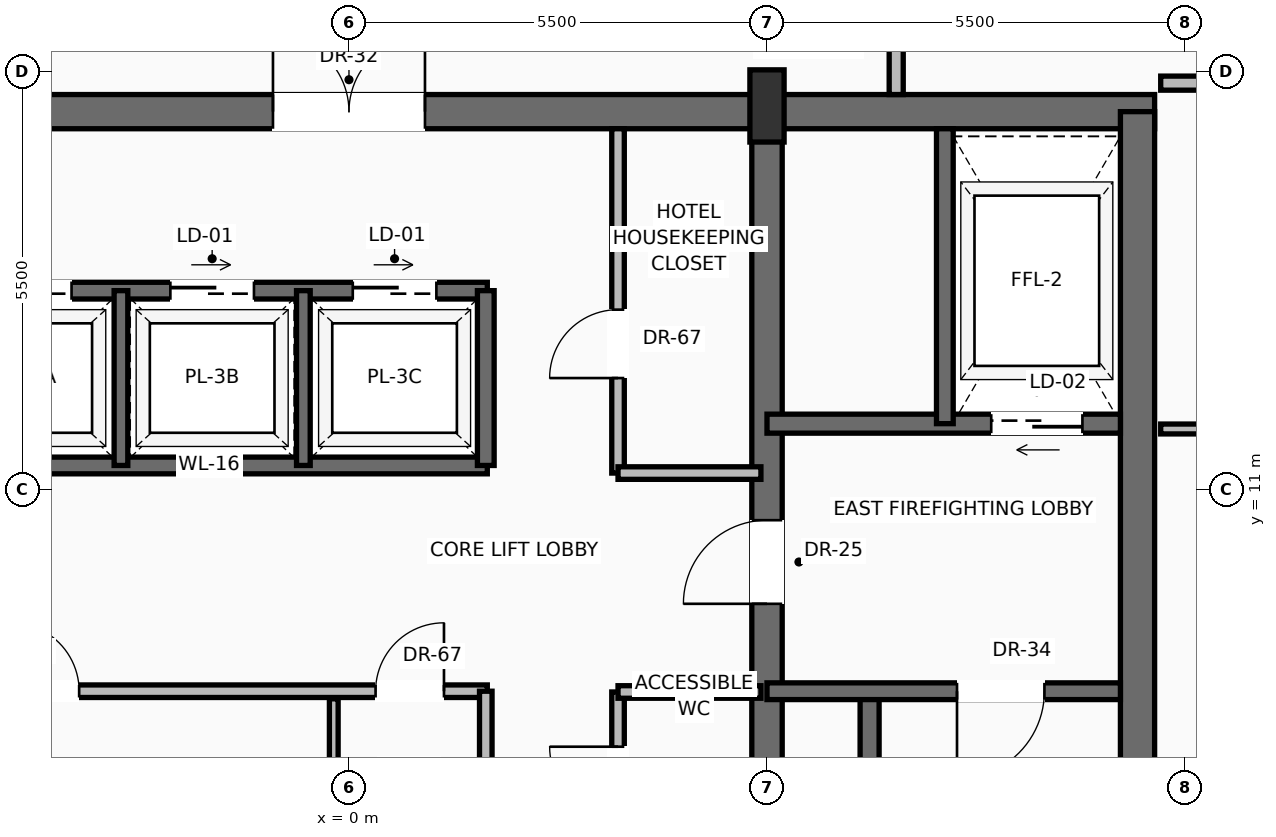
"""IFC4 building model, lengths in metres.
Left out: names, types, materials, properties, quantities, classifications, styles, units other than length and angle.
Written with IfcOpenShell. Run it as: python <this file> out.ifc"""

import sys

from ifc_helpers import new_model, si_unit, direction, frame, frame_2d, origin, origin_2d, place, context, subcontext, project, spatial, rectangle, extrude, source, transform, mapped, element, fill, save


model = new_model("IFC4")
c1 = context("Model", 3, precision=1e-05, world=origin(), true_north=direction((0.0, 1.0)))
c2 = subcontext(c1, "Body", "Model", "MODEL_VIEW")
j1 = project(units=[si_unit("LENGTHUNIT", "METRE"), si_unit("PLANEANGLEUNIT", "RADIAN")], contexts=[c1])
p1 = place(None, origin())
s1 = spatial("IfcSite", under=j1, at=p1, CompositionType="ELEMENT")
p2 = place(p1, origin())
s2 = spatial("IfcBuilding", under=s1, at=p2, CompositionType="ELEMENT")
p3 = place(p2, frame((0.0, 0.0, 293.7)))
s3 = spatial("IfcBuildingStorey", under=s2, at=p3, CompositionType="ELEMENT", Elevation=293.7)
p4 = place(p3, frame((-10.6, 15.975, 0.0), z_axis=(0.0, 0.0, 1.0), x_axis=(1.0, 0.0, 0.0)))
e1 = element("IfcWall", 1, at=p4, inside=s3, PredefinedType="SHEAR", context=c2, shape_type="SweptSolid", body=[
    extrude(rectangle(XDim=21.2, YDim=0.45, at=frame_2d((10.6, 0.0))), origin(), (0.0, 0.0, 1.0), 3.24),
])
p5 = place(p4, frame((3.17, 0.0, 0.0)))
e2 = element("IfcOpeningElement", 2, at=p5, cuts=e1, PredefinedType="OPENING", context=c2, shape_type="SweptSolid", body=[
    extrude(rectangle(XDim=1.3, YDim=2.3, at=frame_2d((0.65, 1.15))), frame((0.0, 0.235, 0.0), z_axis=(0.0, -1.0, 0.0), x_axis=(1.0, 0.0, 0.0)), (0.0, 0.0, 1.0), 0.47),
])
p6 = place(p4, frame((9.6, 0.0, 0.0)))
e3 = element("IfcOpeningElement", 3, at=p6, cuts=e1, PredefinedType="OPENING", context=c2, shape_type="SweptSolid", body=[
    extrude(rectangle(XDim=2.0, YDim=2.4, at=frame_2d((1.0, 1.2))), frame((0.0, 0.235, 0.0), z_axis=(0.0, -1.0, 0.0), x_axis=(1.0, 0.0, 0.0)), (0.0, 0.0, 1.0), 0.47),
])
p7 = place(p3, frame((10.375, 0.625, 0.0), z_axis=(0.0, 0.0, 1.0), x_axis=(0.0, 1.0, 0.0)))
e4 = element("IfcWall", 4, at=p7, inside=s3, PredefinedType="SHEAR", context=c2, shape_type="SweptSolid", body=[
    extrude(rectangle(XDim=15.35, YDim=0.45, at=frame_2d((7.675, 0.0))), origin(), (0.0, 0.0, 1.0), 3.24),
])
p8 = place(p3, frame((5.5, 0.625, 0.0), z_axis=(0.0, 0.0, 1.0), x_axis=(0.0, 1.0, 0.0)))
e5 = element("IfcWall", 5, at=p8, inside=s3, PredefinedType="SHEAR", context=c2, shape_type="SweptSolid", body=[
    extrude(rectangle(XDim=15.35, YDim=0.4, at=frame_2d((7.675, 0.0))), origin(), (0.0, 0.0, 1.0), 3.24),
])
p9 = place(p8, frame((8.875, 0.0, 0.0)))
e6 = element("IfcOpeningElement", 6, at=p9, cuts=e5, PredefinedType="OPENING", context=c2, shape_type="SweptSolid", body=[
    extrude(rectangle(XDim=1.1, YDim=2.2, at=frame_2d((0.55, 1.1))), frame((0.0, 0.21, 0.0), z_axis=(0.0, -1.0, 0.0), x_axis=(1.0, 0.0, 0.0)), (0.0, 0.0, 1.0), 0.42),
])
m1 = source(origin(), c2, "Body", "SweptSolid", [
    extrude(rectangle(XDim=0.45, YDim=0.95, at=origin_2d()), origin(), (0.0, 0.0, 1.0), 3.45),
])
p10 = place(p3, frame((5.5, 16.05, 0.0), z_axis=(0.0, 0.0, 1.0), x_axis=(1.0, 0.0, 0.0)))
e7 = element("IfcColumn", 7, at=p10, inside=s3, PredefinedType="PILASTER", context=c2, shape_type="MappedRepresentation", body=[
    mapped(m1, transform((0.0, 0.0, 0.0), scale=1.0)),
])
p11 = place(p3, frame((7.626, 31.593, 0.0), z_axis=(0.0, 0.0, 1.0), x_axis=(0.500533605719, -0.865717107112, 0.0)))
e8 = element("IfcWall", 8, at=p11, inside=s3, PredefinedType="SOLIDWALL", context=c2, shape_type="SweptSolid", body=[
    extrude(rectangle(XDim=20.145, YDim=0.28, at=frame_2d((10.072, 0.0))), origin(), (0.0, 0.0, 1.0), 2.82),
])
p12 = place(p11, frame((4.835, 0.0, 0.0)))
e9 = element("IfcOpeningElement", 9, at=p12, cuts=e8, PredefinedType="OPENING", context=c2, shape_type="SweptSolid", body=[
    extrude(rectangle(XDim=1.6, YDim=2.35, at=frame_2d((0.8, 1.175))), frame((0.0, 0.15, 0.0), z_axis=(0.0, -1.0, 0.0), x_axis=(1.0, 0.0, 0.0)), (0.0, 0.0, 1.0), 0.3),
])
p13 = place(p11, frame((13.698, 0.0, 0.9)))
e10 = element("IfcOpeningElement", 10, at=p13, cuts=e8, PredefinedType="OPENING", context=c2, shape_type="SweptSolid", body=[
    extrude(rectangle(XDim=1.55, YDim=1.75, at=frame_2d((0.775, 0.875))), frame((0.0, 0.15, 0.0), z_axis=(0.0, -1.0, 0.0), x_axis=(1.0, 0.0, 0.0)), (0.0, 0.0, 1.0), 0.3),
])
p14 = place(p3, frame((6.85, 0.85, 0.0), z_axis=(0.0, 0.0, 1.0), x_axis=(0.0, 1.0, 0.0)))
e11 = element("IfcWall", 11, at=p14, inside=s3, PredefinedType="SOLIDWALL", context=c2, shape_type="SweptSolid", body=[
    extrude(rectangle(XDim=7.5, YDim=0.25, at=frame_2d((3.75, 0.0))), origin(), (0.0, 0.0, 1.0), 3.24),
])
p15 = place(p3, frame((10.15, 8.35, 0.0), z_axis=(0.0, 0.0, 1.0), x_axis=(-1.0, 0.0, 0.0)))
e12 = element("IfcWall", 12, at=p15, inside=s3, PredefinedType="SOLIDWALL", context=c2, shape_type="SweptSolid", body=[
    extrude(rectangle(XDim=4.65, YDim=0.22, at=frame_2d((2.325, 0.0))), origin(), (0.0, 0.0, 1.0), 3.24),
])
p16 = place(p15, frame((1.0, 0.0, 0.0)))
e13 = element("IfcOpeningElement", 13, at=p16, cuts=e12, PredefinedType="OPENING", context=c2, shape_type="SweptSolid", body=[
    extrude(rectangle(XDim=1.15, YDim=2.2, at=frame_2d((0.575, 1.1))), frame((0.0, 0.12, 0.0), z_axis=(0.0, -1.0, 0.0), x_axis=(1.0, 0.0, 0.0)), (0.0, 0.0, 1.0), 0.24),
])
p17 = place(p3, frame((10.15, 11.87, 0.0), z_axis=(0.0, 0.0, 1.0), x_axis=(-1.0, 0.0, 0.0)))
e14 = element("IfcWall", 14, at=p17, inside=s3, PredefinedType="SOLIDWALL", context=c2, shape_type="SweptSolid", body=[
    extrude(rectangle(XDim=4.65, YDim=0.25, at=frame_2d((2.325, 0.0))), origin(), (0.0, 0.0, 1.0), 3.24),
])
p18 = place(p17, frame((0.5, 0.0, 0.0)))
e15 = element("IfcOpeningElement", 15, at=p18, cuts=e14, PredefinedType="OPENING", context=c2, shape_type="SweptSolid", body=[
    extrude(rectangle(XDim=1.2, YDim=2.25, at=frame_2d((0.6, 1.125))), frame((0.0, 0.135, 0.0), z_axis=(0.0, -1.0, 0.0), x_axis=(1.0, 0.0, 0.0)), (0.0, 0.0, 1.0), 0.27),
])
p19 = place(p3, frame((7.84, 11.87, 0.0), z_axis=(0.0, 0.0, 1.0), x_axis=(0.0, 1.0, 0.0)))
e16 = element("IfcWall", 16, at=p19, inside=s3, PredefinedType="SOLIDWALL", context=c2, shape_type="SweptSolid", body=[
    extrude(rectangle(XDim=3.88, YDim=0.22, at=frame_2d((1.94, 0.0))), origin(), (0.0, 0.0, 1.0), 3.24),
])
p20 = place(p3, frame((3.54, 6.0, 0.0), z_axis=(0.0, 0.0, 1.0), x_axis=(0.0, 1.0, 0.0)))
e17 = element("IfcWall", 17, at=p20, inside=s3, PredefinedType="PARTITIONING", context=c2, shape_type="SweptSolid", body=[
    extrude(rectangle(XDim=2.34, YDim=0.165, at=frame_2d((1.17, 0.0))), origin(), (0.0, 0.0, 1.0), 3.232),
])
p21 = place(p20, frame((0.72, 0.0, 0.0)))
e18 = element("IfcOpeningElement", 18, at=p21, cuts=e17, PredefinedType="OPENING", context=c2, shape_type="SweptSolid", body=[
    extrude(rectangle(XDim=0.9, YDim=2.1, at=frame_2d((0.45, 1.05))), frame((0.0, 0.093, 0.0), z_axis=(0.0, -1.0, 0.0), x_axis=(1.0, 0.0, 0.0)), (0.0, 0.0, 1.0), 0.185),
])
p22 = place(p3, frame((3.54, 8.34, 0.0), z_axis=(0.0, 0.0, 1.0), x_axis=(1.0, 0.0, 0.0)))
e19 = element("IfcWall", 19, at=p22, inside=s3, PredefinedType="PARTITIONING", context=c2, shape_type="SweptSolid", body=[
    extrude(rectangle(XDim=1.88, YDim=0.165, at=frame_2d((0.94, 0.0))), origin(), (0.0, 0.0, 1.0), 3.232),
])
p23 = place(p3, frame((-5.3, 8.35, 0.0), z_axis=(0.0, 0.0, 1.0), x_axis=(1.0, 0.0, 0.0)))
e20 = element("IfcWall", 20, at=p23, inside=s3, PredefinedType="PARTITIONING", context=c2, shape_type="SweptSolid", body=[
    extrude(rectangle(XDim=7.12, YDim=0.165, at=frame_2d((3.56, 0.0))), origin(), (0.0, 0.0, 1.0), 3.232),
])
p24 = place(p23, frame((0.85, 0.0, 0.0)))
e21 = element("IfcOpeningElement", 21, at=p24, cuts=e20, PredefinedType="OPENING", context=c2, shape_type="SweptSolid", body=[
    extrude(rectangle(XDim=0.9, YDim=2.1, at=frame_2d((0.45, 1.05))), frame((0.0, 0.093, 0.0), z_axis=(0.0, -1.0, 0.0), x_axis=(1.0, 0.0, 0.0)), (0.0, 0.0, 1.0), 0.185),
])
p25 = place(p23, frame((5.65, 0.0, 0.0)))
e22 = element("IfcOpeningElement", 22, at=p25, cuts=e20, PredefinedType="OPENING", context=c2, shape_type="SweptSolid", body=[
    extrude(rectangle(XDim=0.9, YDim=2.1, at=frame_2d((0.45, 1.05))), frame((0.0, 0.093, 0.0), z_axis=(0.0, -1.0, 0.0), x_axis=(1.0, 0.0, 0.0)), (0.0, 0.0, 1.0), 0.185),
])
p26 = place(p3, frame((1.8, 6.1, 0.0), z_axis=(0.0, 0.0, 1.0), x_axis=(0.0, 1.0, 0.0)))
e23 = element("IfcWall", 23, at=p26, inside=s3, PredefinedType="PARTITIONING", context=c2, shape_type="SweptSolid", body=[
    extrude(rectangle(XDim=2.25, YDim=0.165, at=frame_2d((1.125, 0.0))), origin(), (0.0, 0.0, 1.0), 3.232),
])
p27 = place(p3, frame((-0.2, 6.1, 0.0), z_axis=(0.0, 0.0, 1.0), x_axis=(0.0, 1.0, 0.0)))
e24 = element("IfcWall", 24, at=p27, inside=s3, PredefinedType="PARTITIONING", context=c2, shape_type="SweptSolid", body=[
    extrude(rectangle(XDim=2.15, YDim=0.115, at=frame_2d((1.075, 0.0))), origin(), (0.0, 0.0, 1.0), 3.232),
])
p28 = place(p3, frame((-5.5, 11.32, 0.0), z_axis=(0.0, 0.0, 1.0), x_axis=(1.0, 0.0, 0.0)))
e25 = element("IfcWall", 25, at=p28, inside=s3, PredefinedType="SOLIDWALL", context=c2, shape_type="SweptSolid", body=[
    extrude(rectangle(XDim=7.32, YDim=0.22, at=frame_2d((3.66, 0.0))), origin(), (0.0, 0.0, 1.0), 3.24),
])
p29 = place(p3, frame((-5.5, 13.62, 0.0), z_axis=(0.0, 0.0, 1.0), x_axis=(1.0, 0.0, 0.0)))
e26 = element("IfcWall", 26, at=p29, inside=s3, PredefinedType="SOLIDWALL", context=c2, shape_type="SweptSolid", body=[
    extrude(rectangle(XDim=7.32, YDim=0.22, at=frame_2d((3.66, 0.0))), origin(), (0.0, 0.0, 1.0), 3.24),
])
p30 = place(p29, frame((0.75, 0.0, 0.0)))
e27 = element("IfcOpeningElement", 27, at=p30, cuts=e26, PredefinedType="OPENING", context=c2, shape_type="SweptSolid", body=[
    extrude(rectangle(XDim=1.1, YDim=2.2, at=frame_2d((0.55, 1.1))), frame((0.0, 0.12, 0.0), z_axis=(0.0, -1.0, 0.0), x_axis=(1.0, 0.0, 0.0)), (0.0, 0.0, 1.0), 0.24),
])
p31 = place(p29, frame((3.15, 0.0, 0.0)))
e28 = element("IfcOpeningElement", 28, at=p31, cuts=e26, PredefinedType="OPENING", context=c2, shape_type="SweptSolid", body=[
    extrude(rectangle(XDim=1.1, YDim=2.2, at=frame_2d((0.55, 1.1))), frame((0.0, 0.12, 0.0), z_axis=(0.0, -1.0, 0.0), x_axis=(1.0, 0.0, 0.0)), (0.0, 0.0, 1.0), 0.24),
])
p32 = place(p29, frame((5.55, 0.0, 0.0)))
e29 = element("IfcOpeningElement", 29, at=p32, cuts=e26, PredefinedType="OPENING", context=c2, shape_type="SweptSolid", body=[
    extrude(rectangle(XDim=1.1, YDim=2.2, at=frame_2d((0.55, 1.1))), frame((0.0, 0.12, 0.0), z_axis=(0.0, -1.0, 0.0), x_axis=(1.0, 0.0, 0.0)), (0.0, 0.0, 1.0), 0.24),
])
p33 = place(p3, frame((1.8, 11.32, 0.0), z_axis=(0.0, 0.0, 1.0), x_axis=(0.0, 1.0, 0.0)))
e30 = element("IfcWall", 30, at=p33, inside=s3, PredefinedType="SOLIDWALL", context=c2, shape_type="SweptSolid", body=[
    extrude(rectangle(XDim=2.3, YDim=0.22, at=frame_2d((1.15, 0.0))), origin(), (0.0, 0.0, 1.0), 3.24),
])
for number, where, z_axis, x_axis in (
    (31, (-3.0, 11.32, 0.0), (0.0, 0.0, 1.0), (0.0, 1.0, 0.0)),
    (32, (-0.6, 11.32, 0.0), (0.0, 0.0, 1.0), (0.0, 1.0, 0.0)),
):
    element("IfcWall", number, at=place(p3, frame(where, z_axis=z_axis, x_axis=x_axis)), inside=s3, PredefinedType="SOLIDWALL", context=c2, shape_type="SweptSolid", body=[
        extrude(rectangle(XDim=2.3, YDim=0.18, at=frame_2d((1.15, 0.0))), origin(), (0.0, 0.0, 1.0), 3.24),
    ])
p34 = place(p3, frame((3.54, 11.22, 0.0), z_axis=(0.0, 0.0, 1.0), x_axis=(0.0, 1.0, 0.0)))
e33 = element("IfcWall", 33, at=p34, inside=s3, PredefinedType="PARTITIONING", context=c2, shape_type="SweptSolid", body=[
    extrude(rectangle(XDim=4.53, YDim=0.165, at=frame_2d((2.265, 0.0))), origin(), (0.0, 0.0, 1.0), 3.232),
])
p35 = place(p34, frame((1.25, 0.0, 0.0)))
e34 = element("IfcOpeningElement", 34, at=p35, cuts=e33, PredefinedType="OPENING", context=c2, shape_type="SweptSolid", body=[
    extrude(rectangle(XDim=0.9, YDim=2.1, at=frame_2d((0.45, 1.05))), frame((0.0, 0.093, 0.0), z_axis=(0.0, -1.0, 0.0), x_axis=(1.0, 0.0, 0.0)), (0.0, 0.0, 1.0), 0.185),
])
p36 = place(p3, frame((3.54, 11.22, 0.0), z_axis=(0.0, 0.0, 1.0), x_axis=(1.0, 0.0, 0.0)))
e35 = element("IfcWall", 35, at=p36, inside=s3, PredefinedType="PARTITIONING", context=c2, shape_type="SweptSolid", body=[
    extrude(rectangle(XDim=1.88, YDim=0.165, at=frame_2d((0.94, 0.0))), origin(), (0.0, 0.0, 1.0), 3.232),
])
p37 = place(p3, frame((7.2, 16.2, 0.0), z_axis=(0.0, 0.0, 1.0), x_axis=(0.0, 1.0, 0.0)))
e36 = element("IfcWall", 36, at=p37, inside=s3, PredefinedType="PARTITIONING", context=c2, shape_type="SweptSolid", body=[
    extrude(rectangle(XDim=10.4, YDim=0.185, at=frame_2d((5.2, 0.0))), origin(), (0.0, 0.0, 1.0), 3.232),
])
p38 = place(p37, frame((2.198, 0.0, 0.0)))
e37 = element("IfcOpeningElement", 37, at=p38, cuts=e36, PredefinedType="OPENING", context=c2, shape_type="SweptSolid", body=[
    extrude(rectangle(XDim=1.05, YDim=2.25, at=frame_2d((0.525, 1.125))), frame((0.0, 0.103, 0.0), z_axis=(0.0, -1.0, 0.0), x_axis=(1.0, 0.0, 0.0)), (0.0, 0.0, 1.0), 0.205),
])
p39 = place(p37, frame((5.252, 0.0, 0.0)))
e38 = element("IfcOpeningElement", 38, at=p39, cuts=e36, PredefinedType="OPENING", context=c2, shape_type="SweptSolid", body=[
    extrude(rectangle(XDim=1.05, YDim=2.25, at=frame_2d((0.525, 1.125))), frame((0.0, 0.103, 0.0), z_axis=(0.0, -1.0, 0.0), x_axis=(1.0, 0.0, 0.0)), (0.0, 0.0, 1.0), 0.205),
])
p40 = place(p37, frame((8.369, 0.0, 0.0)))
e39 = element("IfcOpeningElement", 39, at=p40, cuts=e36, PredefinedType="OPENING", context=c2, shape_type="SweptSolid", body=[
    extrude(rectangle(XDim=1.05, YDim=2.25, at=frame_2d((0.525, 1.125))), frame((0.0, 0.103, 0.0), z_axis=(0.0, -1.0, 0.0), x_axis=(1.0, 0.0, 0.0)), (0.0, 0.0, 1.0), 0.205),
])
p41 = place(p3, frame((10.68, 16.35, 0.0), z_axis=(0.0, 0.0, 1.0), x_axis=(1.0, 0.0, 0.0)))
e40 = element("IfcWall", 40, at=p41, inside=s3, PredefinedType="PARTITIONING", context=c2, shape_type="SweptSolid", body=[
    extrude(rectangle(XDim=5.909, YDim=0.185, at=frame_2d((2.955, 0.0))), origin(), (0.0, 0.0, 1.0), 3.232),
])
p42 = place(p41, frame((1.645, 0.0, 0.0)))
e41 = element("IfcOpeningElement", 41, at=p42, cuts=e40, PredefinedType="OPENING", context=c2, shape_type="SweptSolid", body=[
    extrude(rectangle(XDim=1.05, YDim=2.25, at=frame_2d((0.525, 1.125))), frame((0.0, 0.103, 0.0), z_axis=(0.0, -1.0, 0.0), x_axis=(1.0, 0.0, 0.0)), (0.0, 0.0, 1.0), 0.205),
])
p43 = place(p3, frame((10.68, 11.8, 0.0), z_axis=(0.0, 0.0, 1.0), x_axis=(1.0, 0.0, 0.0)))
e42 = element("IfcWall", 42, at=p43, inside=s3, PredefinedType="PARTITIONING", context=c2, shape_type="SweptSolid", body=[
    extrude(rectangle(XDim=8.54, YDim=0.13, at=frame_2d((4.27, 0.0))), origin(), (0.0, 0.0, 1.0), 3.232),
])
p44 = place(p43, frame((3.402, 0.0, 0.0)))
e43 = element("IfcOpeningElement", 43, at=p44, cuts=e42, PredefinedType="OPENING", context=c2, shape_type="SweptSolid", body=[
    extrude(rectangle(XDim=0.95, YDim=2.2, at=frame_2d((0.475, 1.1))), frame((0.0, 0.075, 0.0), z_axis=(0.0, -1.0, 0.0), x_axis=(1.0, 0.0, 0.0)), (0.0, 0.0, 1.0), 0.15),
])
m2 = source(origin(), c2, "Body", "SweptSolid", [
    extrude(rectangle(XDim=1.15, YDim=2.2, at=frame_2d((0.575, 1.1))), frame((0.0, 0.025, 0.0), z_axis=(0.0, -1.0, 0.0), x_axis=(1.0, 0.0, 0.0)), (0.0, 0.0, 1.0), 0.05),
])
p45 = place(p16, origin())
e44 = element("IfcDoor", 44, at=p45, inside=s3, OperationType="SINGLE_SWING_RIGHT", PredefinedType="DOOR", context=c2, shape_type="MappedRepresentation", body=[
    mapped(m2, transform((0.0, 0.0, 0.0), scale=1.0)),
])
fill(e13, e44)
m3 = source(origin(), c2, "Body", "SweptSolid", [
    extrude(rectangle(XDim=1.1, YDim=2.2, at=frame_2d((0.55, 1.1))), frame((0.0, 0.025, 0.0), z_axis=(0.0, -1.0, 0.0), x_axis=(1.0, 0.0, 0.0)), (0.0, 0.0, 1.0), 0.05),
])
p46 = place(p9, origin())
e45 = element("IfcDoor", 45, at=p46, inside=s3, OperationType="SINGLE_SWING_LEFT", PredefinedType="DOOR", context=c2, shape_type="MappedRepresentation", body=[
    mapped(m3, transform((0.0, 0.0, 0.0), scale=1.0)),
])
fill(e6, e45)
m4 = source(origin(), c2, "Body", "SweptSolid", [
    extrude(rectangle(XDim=1.2, YDim=2.25, at=frame_2d((0.6, 1.125))), frame((0.0, 0.025, 0.0), z_axis=(0.0, -1.0, 0.0), x_axis=(1.0, 0.0, 0.0)), (0.0, 0.0, 1.0), 0.05),
])
p47 = place(p18, origin())
e46 = element("IfcDoor", 46, at=p47, inside=s3, OperationType="SLIDING_TO_RIGHT", PredefinedType="DOOR", context=c2, shape_type="MappedRepresentation", body=[
    mapped(m4, transform((0.0, 0.0, 0.0), scale=1.0)),
])
fill(e15, e46)
m5 = source(origin(), c2, "Body", "SweptSolid", [
    extrude(rectangle(XDim=2.0, YDim=2.4, at=frame_2d((1.0, 1.2))), frame((0.0, 0.025, 0.0), z_axis=(0.0, -1.0, 0.0), x_axis=(1.0, 0.0, 0.0)), (0.0, 0.0, 1.0), 0.05),
])
p48 = place(p6, origin())
e47 = element("IfcDoor", 47, at=p48, inside=s3, OperationType="DOUBLE_DOOR_SINGLE_SWING", PredefinedType="DOOR", context=c2, shape_type="MappedRepresentation", body=[
    mapped(m5, transform((0.0, 0.0, 0.0), scale=1.0)),
])
fill(e3, e47)
m6 = source(origin(), c2, "Body", "SweptSolid", [
    extrude(rectangle(XDim=0.9, YDim=2.1, at=frame_2d((0.45, 1.05))), frame((0.0, 0.025, 0.0), z_axis=(0.0, -1.0, 0.0), x_axis=(1.0, 0.0, 0.0)), (0.0, 0.0, 1.0), 0.05),
])
p49 = place(p21, origin())
e48 = element("IfcDoor", 48, at=p49, inside=s3, OperationType="SINGLE_SWING_RIGHT", PredefinedType="DOOR", context=c2, shape_type="MappedRepresentation", body=[
    mapped(m6, transform((0.0, 0.0, 0.0), scale=1.0)),
])
fill(e18, e48)
p50 = place(p24, origin())
e49 = element("IfcDoor", 49, at=p50, inside=s3, OperationType="SINGLE_SWING_LEFT", PredefinedType="DOOR", context=c2, shape_type="MappedRepresentation", body=[
    mapped(m6, transform((0.0, 0.0, 0.0), scale=1.0)),
])
fill(e21, e49)
p51 = place(p25, origin())
e50 = element("IfcDoor", 50, at=p51, inside=s3, OperationType="SINGLE_SWING_RIGHT", PredefinedType="DOOR", context=c2, shape_type="MappedRepresentation", body=[
    mapped(m6, transform((0.0, 0.0, 0.0), scale=1.0)),
])
fill(e22, e50)
m7 = source(origin(), c2, "Body", "SweptSolid", [
    extrude(rectangle(XDim=1.1, YDim=2.2, at=frame_2d((0.55, 1.1))), frame((0.0, 0.025, 0.0), z_axis=(0.0, -1.0, 0.0), x_axis=(1.0, 0.0, 0.0)), (0.0, 0.0, 1.0), 0.05),
])
p52 = place(p30, origin())
e51 = element("IfcDoor", 51, at=p52, inside=s3, OperationType="SLIDING_TO_RIGHT", PredefinedType="DOOR", context=c2, shape_type="MappedRepresentation", body=[
    mapped(m7, transform((0.0, 0.0, 0.0), scale=1.0)),
])
fill(e27, e51)
p53 = place(p31, origin())
e52 = element("IfcDoor", 52, at=p53, inside=s3, OperationType="SLIDING_TO_RIGHT", PredefinedType="DOOR", context=c2, shape_type="MappedRepresentation", body=[
    mapped(m7, transform((0.0, 0.0, 0.0), scale=1.0)),
])
fill(e28, e52)
p54 = place(p32, origin())
e53 = element("IfcDoor", 53, at=p54, inside=s3, OperationType="SLIDING_TO_RIGHT", PredefinedType="DOOR", context=c2, shape_type="MappedRepresentation", body=[
    mapped(m7, transform((0.0, 0.0, 0.0), scale=1.0)),
])
fill(e29, e53)
p55 = place(p35, origin())
e54 = element("IfcDoor", 54, at=p55, inside=s3, OperationType="SINGLE_SWING_LEFT", PredefinedType="DOOR", context=c2, shape_type="MappedRepresentation", body=[
    mapped(m6, transform((0.0, 0.0, 0.0), scale=1.0)),
])
fill(e34, e54)
save(model, sys.argv[1])
